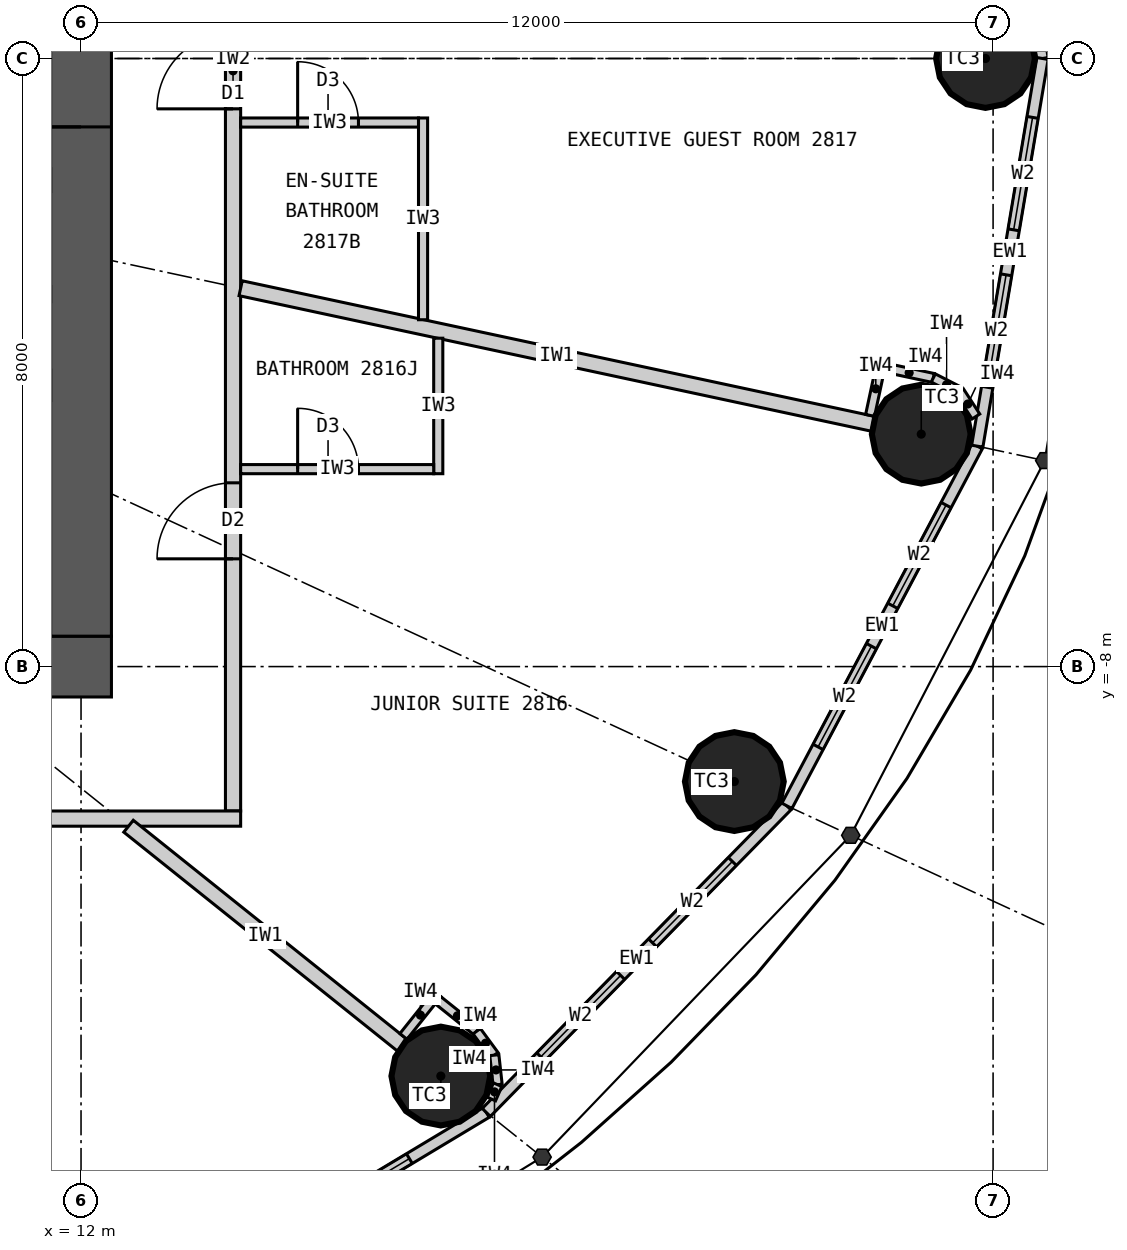
"""IFC4 building model, lengths in metres.
Left out: names, types, materials, properties, quantities, classifications, styles, units other than length and angle.
Written with IfcOpenShell. Run it as: python <this file> out.ifc"""

import sys

from ifc_helpers import new_model, si_unit, direction, frame, frame_2d, origin, origin_2d, place, context, subcontext, project, spatial, rectangle, circle, extrude, element, fill, save


model = new_model("IFC4")
c1 = context("Model", 3, precision=1e-05, world=origin(), true_north=direction((0.0, 1.0)))
c2 = subcontext(c1, "Body", "Model", "MODEL_VIEW")
j1 = project(units=[si_unit("LENGTHUNIT", "METRE"), si_unit("PLANEANGLEUNIT", "RADIAN")], contexts=[c1])
p1 = place(None, origin())
s1 = spatial("IfcSite", under=j1, at=p1, CompositionType="ELEMENT")
p2 = place(p1, origin())
s2 = spatial("IfcBuilding", under=s1, at=p2, CompositionType="ELEMENT")
p3 = place(p2, frame((0.0, 0.0, 112.2)))
s3 = spatial("IfcBuildingStorey", under=s2, at=p3, CompositionType="ELEMENT", Elevation=112.2)
for number, where, z_axis, x_axis in (
    (1, (23.9, 0.0, 0.0), (0.0, 0.0, 1.0), (1.0, 0.0, 0.0)),
    (2, (16.734, -13.387, 0.0), (0.0, 0.0, 1.0), (1.0, 0.0, 0.0)),
    (3, (20.596, -9.513, 0.0), (0.0, 0.0, 1.0), (1.0, 0.0, 0.0)),
    (4, (23.055, -4.942, 0.0), (0.0, 0.0, 1.0), (1.0, 0.0, 0.0)),
):
    element("IfcColumn", number, at=place(p3, frame(where, z_axis=z_axis, x_axis=x_axis)), inside=s3, PredefinedType="COLUMN", context=c2, shape_type="SweptSolid", body=[
        extrude(circle(Radius=0.65, at=origin_2d()), origin(), (0.0, 0.0, 1.0), 3.3),
    ])
p4 = place(p3, frame((12.4, -8.0, 0.0), z_axis=(0.0, 0.0, 1.0), x_axis=(-1.0, 0.0, 0.0)))
e5 = element("IfcWall", 5, at=p4, inside=s3, PredefinedType="SHEAR", context=c2, shape_type="SweptSolid", body=[
    extrude(rectangle(XDim=24.8, YDim=0.8, at=frame_2d((12.4, 0.0))), origin(), (0.0, 0.0, 1.0), 3.3),
])
p5 = place(p4, frame((11.1, 0.0, 0.0)))
e6 = element("IfcOpeningElement", 6, at=p5, cuts=e5, PredefinedType="OPENING", context=c2, shape_type="SweptSolid", body=[
    extrude(rectangle(XDim=1.2, YDim=2.2, at=frame_2d((0.6, 1.1))), frame((0.0, 0.41, 0.0), z_axis=(0.0, -1.0, 0.0), x_axis=(1.0, 0.0, 0.0)), (0.0, 0.0, 1.0), 0.82),
])
p6 = place(p4, frame((18.7, 0.0, 0.0)))
e7 = element("IfcOpeningElement", 7, at=p6, cuts=e5, PredefinedType="OPENING", context=c2, shape_type="SweptSolid", body=[
    extrude(rectangle(XDim=0.9, YDim=2.2, at=frame_2d((0.45, 1.1))), frame((0.0, 0.41, 0.0), z_axis=(0.0, -1.0, 0.0), x_axis=(1.0, 0.0, 0.0)), (0.0, 0.0, 1.0), 0.82),
])
p7 = place(p3, frame((12.0, -7.6, 0.0), z_axis=(0.0, 0.0, 1.0), x_axis=(0.0, 1.0, 0.0)))
e8 = element("IfcWall", 8, at=p7, inside=s3, PredefinedType="SHEAR", context=c2, shape_type="SweptSolid", body=[
    extrude(rectangle(XDim=15.2, YDim=0.8, at=frame_2d((7.6, 0.0))), origin(), (0.0, 0.0, 1.0), 3.3),
])
p8 = place(p7, frame((6.7, 0.0, 0.0)))
e9 = element("IfcOpeningElement", 9, at=p8, cuts=e8, PredefinedType="OPENING", context=c2, shape_type="SweptSolid", body=[
    extrude(rectangle(XDim=1.8, YDim=2.2, at=frame_2d((0.9, 1.1))), frame((0.0, 0.41, 0.0), z_axis=(0.0, -1.0, 0.0), x_axis=(1.0, 0.0, 0.0)), (0.0, 0.0, 1.0), 0.82),
])
p9 = place(p3, frame((24.65, 0.0, 0.0), z_axis=(0.0, 0.0, 1.0), x_axis=(-0.165883894218, 0.986145290329, 0.0)))
e10 = element("IfcWall", 10, at=p9, inside=s3, PredefinedType="ELEMENTEDWALL", context=c2, shape_type="SweptSolid", body=[
    extrude(rectangle(XDim=5.172, YDim=0.15, at=frame_2d((2.586, 0.0))), origin(), (0.0, 0.0, 1.0), 3.12),
])
p10 = place(p9, frame((0.786, 0.0, 0.9)))
e11 = element("IfcOpeningElement", 11, at=p10, cuts=e10, PredefinedType="OPENING", context=c2, shape_type="SweptSolid", body=[
    extrude(rectangle(XDim=1.5, YDim=1.9, at=frame_2d((0.75, 0.95))), frame((0.0, 0.085, 0.0), z_axis=(0.0, -1.0, 0.0), x_axis=(1.0, 0.0, 0.0)), (0.0, 0.0, 1.0), 0.17),
])
p11 = place(p9, frame((2.886, 0.0, 0.9)))
e12 = element("IfcOpeningElement", 12, at=p11, cuts=e10, PredefinedType="OPENING", context=c2, shape_type="SweptSolid", body=[
    extrude(rectangle(XDim=1.5, YDim=1.9, at=frame_2d((0.75, 0.95))), frame((0.0, 0.085, 0.0), z_axis=(0.0, -1.0, 0.0), x_axis=(1.0, 0.0, 0.0)), (0.0, 0.0, 1.0), 0.17),
])
p12 = place(p3, frame((12.221, -16.935, 0.0), z_axis=(0.0, 0.0, 1.0), x_axis=(0.857308573723, 0.514802884044, 0.0)))
e13 = element("IfcWall", 13, at=p12, inside=s3, PredefinedType="ELEMENTEDWALL", context=c2, shape_type="SweptSolid", body=[
    extrude(rectangle(XDim=5.961, YDim=0.15, at=frame_2d((2.98, 0.0))), origin(), (0.0, 0.0, 1.0), 3.12),
])
p13 = place(p12, frame((1.181, 0.0, 0.9)))
e14 = element("IfcOpeningElement", 14, at=p13, cuts=e13, PredefinedType="OPENING", context=c2, shape_type="SweptSolid", body=[
    extrude(rectangle(XDim=1.5, YDim=1.9, at=frame_2d((0.75, 0.95))), frame((0.0, 0.085, 0.0), z_axis=(0.0, -1.0, 0.0), x_axis=(1.0, 0.0, 0.0)), (0.0, 0.0, 1.0), 0.17),
])
p14 = place(p12, frame((3.281, 0.0, 0.9)))
e15 = element("IfcOpeningElement", 15, at=p14, cuts=e13, PredefinedType="OPENING", context=c2, shape_type="SweptSolid", body=[
    extrude(rectangle(XDim=1.5, YDim=1.9, at=frame_2d((0.75, 0.95))), frame((0.0, 0.085, 0.0), z_axis=(0.0, -1.0, 0.0), x_axis=(1.0, 0.0, 0.0)), (0.0, 0.0, 1.0), 0.17),
])
p15 = place(p3, frame((17.332, -13.866, 0.0), z_axis=(0.0, 0.0, 1.0), x_axis=(0.700136650834, 0.714008872605, 0.0)))
e16 = element("IfcWall", 16, at=p15, inside=s3, PredefinedType="ELEMENTEDWALL", context=c2, shape_type="SweptSolid", body=[
    extrude(rectangle(XDim=5.649, YDim=0.15, at=frame_2d((2.825, 0.0))), origin(), (0.0, 0.0, 1.0), 3.12),
])
p16 = place(p15, frame((1.025, 0.0, 0.9)))
e17 = element("IfcOpeningElement", 17, at=p16, cuts=e16, PredefinedType="OPENING", context=c2, shape_type="SweptSolid", body=[
    extrude(rectangle(XDim=1.5, YDim=1.9, at=frame_2d((0.75, 0.95))), frame((0.0, 0.085, 0.0), z_axis=(0.0, -1.0, 0.0), x_axis=(1.0, 0.0, 0.0)), (0.0, 0.0, 1.0), 0.17),
])
p17 = place(p15, frame((3.125, 0.0, 0.9)))
e18 = element("IfcOpeningElement", 18, at=p17, cuts=e16, PredefinedType="OPENING", context=c2, shape_type="SweptSolid", body=[
    extrude(rectangle(XDim=1.5, YDim=1.9, at=frame_2d((0.75, 0.95))), frame((0.0, 0.085, 0.0), z_axis=(0.0, -1.0, 0.0), x_axis=(1.0, 0.0, 0.0)), (0.0, 0.0, 1.0), 0.17),
])
p18 = place(p3, frame((21.287, -9.832, 0.0), z_axis=(0.0, 0.0, 1.0), x_axis=(0.467814388454, 0.883826735257, 0.0)))
e19 = element("IfcWall", 19, at=p18, inside=s3, PredefinedType="ELEMENTEDWALL", context=c2, shape_type="SweptSolid", body=[
    extrude(rectangle(XDim=5.354, YDim=0.15, at=frame_2d((2.677, 0.0))), origin(), (0.0, 0.0, 1.0), 3.12),
])
p19 = place(p18, frame((0.877, 0.0, 0.9)))
e20 = element("IfcOpeningElement", 20, at=p19, cuts=e19, PredefinedType="OPENING", context=c2, shape_type="SweptSolid", body=[
    extrude(rectangle(XDim=1.5, YDim=1.9, at=frame_2d((0.75, 0.95))), frame((0.0, 0.085, 0.0), z_axis=(0.0, -1.0, 0.0), x_axis=(1.0, 0.0, 0.0)), (0.0, 0.0, 1.0), 0.17),
])
p20 = place(p18, frame((2.977, 0.0, 0.9)))
e21 = element("IfcOpeningElement", 21, at=p20, cuts=e19, PredefinedType="OPENING", context=c2, shape_type="SweptSolid", body=[
    extrude(rectangle(XDim=1.5, YDim=1.9, at=frame_2d((0.75, 0.95))), frame((0.0, 0.085, 0.0), z_axis=(0.0, -1.0, 0.0), x_axis=(1.0, 0.0, 0.0)), (0.0, 0.0, 1.0), 0.17),
])
p21 = place(p3, frame((23.792, -5.1, 0.0), z_axis=(0.0, 0.0, 1.0), x_axis=(0.165883894218, 0.986145290329, 0.0)))
e22 = element("IfcWall", 22, at=p21, inside=s3, PredefinedType="ELEMENTEDWALL", context=c2, shape_type="SweptSolid", body=[
    extrude(rectangle(XDim=5.172, YDim=0.15, at=frame_2d((2.586, 0.0))), origin(), (0.0, 0.0, 1.0), 3.12),
])
p22 = place(p21, frame((0.786, 0.0, 0.9)))
e23 = element("IfcOpeningElement", 23, at=p22, cuts=e22, PredefinedType="OPENING", context=c2, shape_type="SweptSolid", body=[
    extrude(rectangle(XDim=1.5, YDim=1.9, at=frame_2d((0.75, 0.95))), frame((0.0, 0.085, 0.0), z_axis=(0.0, -1.0, 0.0), x_axis=(1.0, 0.0, 0.0)), (0.0, 0.0, 1.0), 0.17),
])
p23 = place(p21, frame((2.886, 0.0, 0.9)))
e24 = element("IfcOpeningElement", 24, at=p23, cuts=e22, PredefinedType="OPENING", context=c2, shape_type="SweptSolid", body=[
    extrude(rectangle(XDim=1.5, YDim=1.9, at=frame_2d((0.75, 0.95))), frame((0.0, 0.085, 0.0), z_axis=(0.0, -1.0, 0.0), x_axis=(1.0, 0.0, 0.0)), (0.0, 0.0, 1.0), 0.17),
])
p24 = place(p3, frame((14.0, -9.9, 0.0), z_axis=(0.0, 0.0, 1.0), x_axis=(0.0, 1.0, 0.0)))
e25 = element("IfcWall", 25, at=p24, inside=s3, PredefinedType="PARTITIONING", context=c2, shape_type="SweptSolid", body=[
    extrude(rectangle(XDim=19.8, YDim=0.2, at=frame_2d((9.9, 0.0))), origin(), (0.0, 0.0, 1.0), 3.12),
])
p25 = place(p24, frame((3.318, 0.0, 0.0)))
e26 = element("IfcOpeningElement", 26, at=p25, cuts=e25, PredefinedType="OPENING", context=c2, shape_type="SweptSolid", body=[
    extrude(rectangle(XDim=1.0, YDim=2.2, at=frame_2d((0.5, 1.1))), frame((0.0, 0.11, 0.0), z_axis=(0.0, -1.0, 0.0), x_axis=(1.0, 0.0, 0.0)), (0.0, 0.0, 1.0), 0.22),
])
p26 = place(p24, frame((9.238, 0.0, 0.0)))
e27 = element("IfcOpeningElement", 27, at=p26, cuts=e25, PredefinedType="OPENING", context=c2, shape_type="SweptSolid", body=[
    extrude(rectangle(XDim=1.0, YDim=2.2, at=frame_2d((0.5, 1.1))), frame((0.0, 0.11, 0.0), z_axis=(0.0, -1.0, 0.0), x_axis=(1.0, 0.0, 0.0)), (0.0, 0.0, 1.0), 0.22),
])
p27 = place(p24, frame((13.742, 0.0, 0.0)))
e28 = element("IfcOpeningElement", 28, at=p27, cuts=e25, PredefinedType="OPENING", context=c2, shape_type="SweptSolid", body=[
    extrude(rectangle(XDim=1.0, YDim=2.2, at=frame_2d((0.5, 1.1))), frame((0.0, 0.11, 0.0), z_axis=(0.0, -1.0, 0.0), x_axis=(1.0, 0.0, 0.0)), (0.0, 0.0, 1.0), 0.22),
])
p28 = place(p24, frame((18.698, 0.0, 0.0)))
e29 = element("IfcOpeningElement", 29, at=p28, cuts=e25, PredefinedType="OPENING", context=c2, shape_type="SweptSolid", body=[
    extrude(rectangle(XDim=1.0, YDim=2.2, at=frame_2d((0.5, 1.1))), frame((0.0, 0.11, 0.0), z_axis=(0.0, -1.0, 0.0), x_axis=(1.0, 0.0, 0.0)), (0.0, 0.0, 1.0), 0.22),
])
p29 = place(p3, frame((14.1, -10.0, 0.0), z_axis=(0.0, 0.0, 1.0), x_axis=(-1.0, 0.0, 0.0)))
e30 = element("IfcWall", 30, at=p29, inside=s3, PredefinedType="PARTITIONING", context=c2, shape_type="SweptSolid", body=[
    extrude(rectangle(XDim=10.817, YDim=0.2, at=frame_2d((5.409, 0.0))), origin(), (0.0, 0.0, 1.0), 3.12),
])
p30 = place(p3, frame((12.625, -10.1, 0.0), z_axis=(0.0, 0.0, 1.0), x_axis=(0.780863644897, -0.624701503182, 0.0)))
e31 = element("IfcWall", 31, at=p30, inside=s3, PredefinedType="PARTITIONING", context=c2, shape_type="SweptSolid", body=[
    extrude(rectangle(XDim=4.612, YDim=0.2, at=frame_2d((2.306, 0.0))), origin(), (0.0, 0.0, 1.0), 2.37),
])
p31 = place(p3, frame((14.1, -3.022, 0.0), z_axis=(0.0, 0.0, 1.0), x_axis=(0.977783513367, -0.209617272638, 0.0)))
e32 = element("IfcWall", 32, at=p31, inside=s3, PredefinedType="PARTITIONING", context=c2, shape_type="SweptSolid", body=[
    extrude(rectangle(XDim=8.508, YDim=0.2, at=frame_2d((4.254, 0.0))), origin(), (0.0, 0.0, 1.0), 2.37),
])
p32 = place(p3, frame((16.7, -3.68, 0.0), z_axis=(0.0, 0.0, 1.0), x_axis=(0.0, -1.0, 0.0)))
e33 = element("IfcWall", 33, at=p32, inside=s3, PredefinedType="PARTITIONING", context=c2, shape_type="SweptSolid", body=[
    extrude(rectangle(XDim=1.783, YDim=0.12, at=frame_2d((0.891, 0.0))), origin(), (0.0, 0.0, 1.0), 3.12),
])
p33 = place(p3, frame((14.1, -5.403, 0.0), z_axis=(0.0, 0.0, 1.0), x_axis=(1.0, 0.0, 0.0)))
e34 = element("IfcWall", 34, at=p33, inside=s3, PredefinedType="PARTITIONING", context=c2, shape_type="SweptSolid", body=[
    extrude(rectangle(XDim=2.54, YDim=0.12, at=frame_2d((1.27, 0.0))), origin(), (0.0, 0.0, 1.0), 3.12),
])
p34 = place(p33, frame((0.75, 0.0, 0.0)))
e35 = element("IfcOpeningElement", 35, at=p34, cuts=e34, PredefinedType="OPENING", context=c2, shape_type="SweptSolid", body=[
    extrude(rectangle(XDim=0.8, YDim=2.1, at=frame_2d((0.4, 1.05))), frame((0.0, 0.07, 0.0), z_axis=(0.0, -1.0, 0.0), x_axis=(1.0, 0.0, 0.0)), (0.0, 0.0, 1.0), 0.14),
])
p35 = place(p3, frame((16.5, -3.437, 0.0), z_axis=(0.0, 0.0, 1.0), x_axis=(0.0, 1.0, 0.0)))
e36 = element("IfcWall", 36, at=p35, inside=s3, PredefinedType="PARTITIONING", context=c2, shape_type="SweptSolid", body=[
    extrude(rectangle(XDim=2.655, YDim=0.12, at=frame_2d((1.327, 0.0))), origin(), (0.0, 0.0, 1.0), 3.12),
])
p36 = place(p3, frame((14.1, -0.843, 0.0), z_axis=(0.0, 0.0, 1.0), x_axis=(1.0, 0.0, 0.0)))
e37 = element("IfcWall", 37, at=p36, inside=s3, PredefinedType="PARTITIONING", context=c2, shape_type="SweptSolid", body=[
    extrude(rectangle(XDim=2.34, YDim=0.12, at=frame_2d((1.17, 0.0))), origin(), (0.0, 0.0, 1.0), 3.12),
])
p37 = place(p36, frame((0.75, 0.0, 0.0)))
e38 = element("IfcOpeningElement", 38, at=p37, cuts=e37, PredefinedType="OPENING", context=c2, shape_type="SweptSolid", body=[
    extrude(rectangle(XDim=0.8, YDim=2.1, at=frame_2d((0.4, 1.05))), frame((0.0, 0.07, 0.0), z_axis=(0.0, -1.0, 0.0), x_axis=(1.0, 0.0, 0.0)), (0.0, 0.0, 1.0), 0.14),
])
p38 = place(p3, frame((16.242, -12.865, 0.0), z_axis=(0.0, 0.0, 1.0), x_axis=(0.624861414622, 0.780735686719, 0.0)))
e39 = element("IfcWall", 39, at=p38, inside=s3, PredefinedType="PARTITIONING", context=c2, shape_type="SweptSolid", body=[
    extrude(rectangle(XDim=0.716, YDim=0.12, at=frame_2d((0.358, 0.0))), origin(), (0.0, 0.0, 1.0), 3.12),
])
p39 = place(p3, frame((16.698, -12.391, 0.0), z_axis=(0.0, 0.0, 1.0), x_axis=(0.780722240533, -0.624878214645, 0.0)))
e40 = element("IfcWall", 40, at=p39, inside=s3, PredefinedType="PARTITIONING", context=c2, shape_type="SweptSolid", body=[
    extrude(rectangle(XDim=0.65, YDim=0.12, at=frame_2d((0.325, 0.0))), origin(), (0.0, 0.0, 1.0), 3.12),
])
p40 = place(p3, frame((17.206, -12.797, 0.0), z_axis=(0.0, 0.0, 1.0), x_axis=(0.592986095904, -0.805212698648, 0.0)))
e41 = element("IfcWall", 41, at=p40, inside=s3, PredefinedType="PARTITIONING", context=c2, shape_type="SweptSolid", body=[
    extrude(rectangle(XDim=0.391, YDim=0.12, at=frame_2d((0.196, 0.0))), origin(), (0.0, 0.0, 1.0), 3.12),
])
p41 = place(p3, frame((17.438, -13.112, 0.0), z_axis=(0.0, 0.0, 1.0), x_axis=(0.109815164188, -0.993952025862, 0.0)))
e42 = element("IfcWall", 42, at=p41, inside=s3, PredefinedType="PARTITIONING", context=c2, shape_type="SweptSolid", body=[
    extrude(rectangle(XDim=0.391, YDim=0.12, at=frame_2d((0.196, 0.0))), origin(), (0.0, 0.0, 1.0), 3.12),
])
p42 = place(p3, frame((17.481, -13.501, 0.0), z_axis=(0.0, 0.0, 1.0), x_axis=(-0.401504188288, -0.915857186895, 0.0)))
e43 = element("IfcWall", 43, at=p42, inside=s3, PredefinedType="PARTITIONING", context=c2, shape_type="SweptSolid", body=[
    extrude(rectangle(XDim=0.206, YDim=0.12, at=frame_2d((0.103, 0.0))), origin(), (0.0, 0.0, 1.0), 3.12),
])
p43 = place(p3, frame((22.382, -4.695, 0.0), z_axis=(0.0, 0.0, 1.0), x_axis=(0.209808658628, 0.977742464438, 0.0)))
e44 = element("IfcWall", 44, at=p43, inside=s3, PredefinedType="PARTITIONING", context=c2, shape_type="SweptSolid", body=[
    extrude(rectangle(XDim=0.716, YDim=0.12, at=frame_2d((0.358, 0.0))), origin(), (0.0, 0.0, 1.0), 3.12),
])
p44 = place(p3, frame((22.578, -4.067, 0.0), z_axis=(0.0, 0.0, 1.0), x_axis=(0.977802414077, -0.209529088731, 0.0)))
e45 = element("IfcWall", 45, at=p44, inside=s3, PredefinedType="PARTITIONING", context=c2, shape_type="SweptSolid", body=[
    extrude(rectangle(XDim=0.65, YDim=0.12, at=frame_2d((0.325, 0.0))), origin(), (0.0, 0.0, 1.0), 3.12),
])
for number, where, z_axis, x_axis in (
    (46, (23.213, -4.203, 0.0), (0.0, 0.0, 1.0), (0.89, -0.456, 0.0)),
    (47, (23.562, -4.381, 0.0), (0.0, 0.0, 1.0), (0.543, -0.84, 0.0)),
):
    element("IfcWall", number, at=place(p3, frame(where, z_axis=z_axis, x_axis=x_axis)), inside=s3, PredefinedType="PARTITIONING", context=c2, shape_type="SweptSolid", body=[
        extrude(rectangle(XDim=0.391, YDim=0.12, at=frame_2d((0.196, 0.0))), origin(), (0.0, 0.0, 1.0), 3.12),
    ])
p45 = place(p14, origin())
e48 = element("IfcWindow", 48, at=p45, inside=s3, PartitioningType="SINGLE_PANEL", PredefinedType="WINDOW", context=c2, shape_type="SweptSolid", body=[
    extrude(rectangle(XDim=1.5, YDim=1.9, at=frame_2d((0.75, 0.95))), frame((0.0, 0.03, 0.0), z_axis=(0.0, -1.0, 0.0), x_axis=(1.0, 0.0, 0.0)), (0.0, 0.0, 1.0), 0.06),
])
fill(e15, e48)
p46 = place(p16, origin())
e49 = element("IfcWindow", 49, at=p46, inside=s3, PartitioningType="SINGLE_PANEL", PredefinedType="WINDOW", context=c2, shape_type="SweptSolid", body=[
    extrude(rectangle(XDim=1.5, YDim=1.9, at=frame_2d((0.75, 0.95))), frame((0.0, 0.03, 0.0), z_axis=(0.0, -1.0, 0.0), x_axis=(1.0, 0.0, 0.0)), (0.0, 0.0, 1.0), 0.06),
])
fill(e17, e49)
p47 = place(p17, origin())
e50 = element("IfcWindow", 50, at=p47, inside=s3, PartitioningType="SINGLE_PANEL", PredefinedType="WINDOW", context=c2, shape_type="SweptSolid", body=[
    extrude(rectangle(XDim=1.5, YDim=1.9, at=frame_2d((0.75, 0.95))), frame((0.0, 0.03, 0.0), z_axis=(0.0, -1.0, 0.0), x_axis=(1.0, 0.0, 0.0)), (0.0, 0.0, 1.0), 0.06),
])
fill(e18, e50)
p48 = place(p19, origin())
e51 = element("IfcWindow", 51, at=p48, inside=s3, PartitioningType="SINGLE_PANEL", PredefinedType="WINDOW", context=c2, shape_type="SweptSolid", body=[
    extrude(rectangle(XDim=1.5, YDim=1.9, at=frame_2d((0.75, 0.95))), frame((0.0, 0.03, 0.0), z_axis=(0.0, -1.0, 0.0), x_axis=(1.0, 0.0, 0.0)), (0.0, 0.0, 1.0), 0.06),
])
fill(e20, e51)
p49 = place(p20, origin())
e52 = element("IfcWindow", 52, at=p49, inside=s3, PartitioningType="SINGLE_PANEL", PredefinedType="WINDOW", context=c2, shape_type="SweptSolid", body=[
    extrude(rectangle(XDim=1.5, YDim=1.9, at=frame_2d((0.75, 0.95))), frame((0.0, 0.03, 0.0), z_axis=(0.0, -1.0, 0.0), x_axis=(1.0, 0.0, 0.0)), (0.0, 0.0, 1.0), 0.06),
])
fill(e21, e52)
p50 = place(p22, origin())
e53 = element("IfcWindow", 53, at=p50, inside=s3, PartitioningType="SINGLE_PANEL", PredefinedType="WINDOW", context=c2, shape_type="SweptSolid", body=[
    extrude(rectangle(XDim=1.5, YDim=1.9, at=frame_2d((0.75, 0.95))), frame((0.0, 0.03, 0.0), z_axis=(0.0, -1.0, 0.0), x_axis=(1.0, 0.0, 0.0)), (0.0, 0.0, 1.0), 0.06),
])
fill(e23, e53)
p51 = place(p23, origin())
e54 = element("IfcWindow", 54, at=p51, inside=s3, PartitioningType="SINGLE_PANEL", PredefinedType="WINDOW", context=c2, shape_type="SweptSolid", body=[
    extrude(rectangle(XDim=1.5, YDim=1.9, at=frame_2d((0.75, 0.95))), frame((0.0, 0.03, 0.0), z_axis=(0.0, -1.0, 0.0), x_axis=(1.0, 0.0, 0.0)), (0.0, 0.0, 1.0), 0.06),
])
fill(e24, e54)
p52 = place(p34, origin())
e55 = element("IfcDoor", 55, at=p52, inside=s3, OperationType="SINGLE_SWING_LEFT", PredefinedType="DOOR", context=c2, shape_type="SweptSolid", body=[
    extrude(rectangle(XDim=0.8, YDim=2.1, at=frame_2d((0.4, 1.05))), frame((0.0, 0.025, 0.0), z_axis=(0.0, -1.0, 0.0), x_axis=(1.0, 0.0, 0.0)), (0.0, 0.0, 1.0), 0.05),
])
fill(e35, e55)
p53 = place(p25, origin())
e56 = element("IfcDoor", 56, at=p53, inside=s3, OperationType="SINGLE_SWING_LEFT", PredefinedType="DOOR", context=c2, shape_type="SweptSolid", body=[
    extrude(rectangle(XDim=1.0, YDim=2.2, at=frame_2d((0.5, 1.1))), frame((0.0, 0.025, 0.0), z_axis=(0.0, -1.0, 0.0), x_axis=(1.0, 0.0, 0.0)), (0.0, 0.0, 1.0), 0.05),
])
fill(e26, e56)
p54 = place(p37, origin())
e57 = element("IfcDoor", 57, at=p54, inside=s3, OperationType="SINGLE_SWING_LEFT", PredefinedType="DOOR", context=c2, shape_type="SweptSolid", body=[
    extrude(rectangle(XDim=0.8, YDim=2.1, at=frame_2d((0.4, 1.05))), frame((0.0, 0.025, 0.0), z_axis=(0.0, -1.0, 0.0), x_axis=(1.0, 0.0, 0.0)), (0.0, 0.0, 1.0), 0.05),
])
fill(e38, e57)
p55 = place(p26, origin())
e58 = element("IfcDoor", 58, at=p55, inside=s3, OperationType="SINGLE_SWING_LEFT", PredefinedType="DOOR", context=c2, shape_type="SweptSolid", body=[
    extrude(rectangle(XDim=1.0, YDim=2.2, at=frame_2d((0.5, 1.1))), frame((0.0, 0.025, 0.0), z_axis=(0.0, -1.0, 0.0), x_axis=(1.0, 0.0, 0.0)), (0.0, 0.0, 1.0), 0.05),
])
fill(e27, e58)
p56 = place(p8, origin())
e59 = element("IfcDoor", 59, at=p56, inside=s3, OperationType="DOUBLE_DOOR_DOUBLE_SWING", PredefinedType="DOOR", context=c2, shape_type="SweptSolid", body=[
    extrude(rectangle(XDim=1.8, YDim=2.2, at=frame_2d((0.9, 1.1))), frame((0.0, 0.025, 0.0), z_axis=(0.0, -1.0, 0.0), x_axis=(1.0, 0.0, 0.0)), (0.0, 0.0, 1.0), 0.05),
])
fill(e9, e59)
save(model, sys.argv[1])
